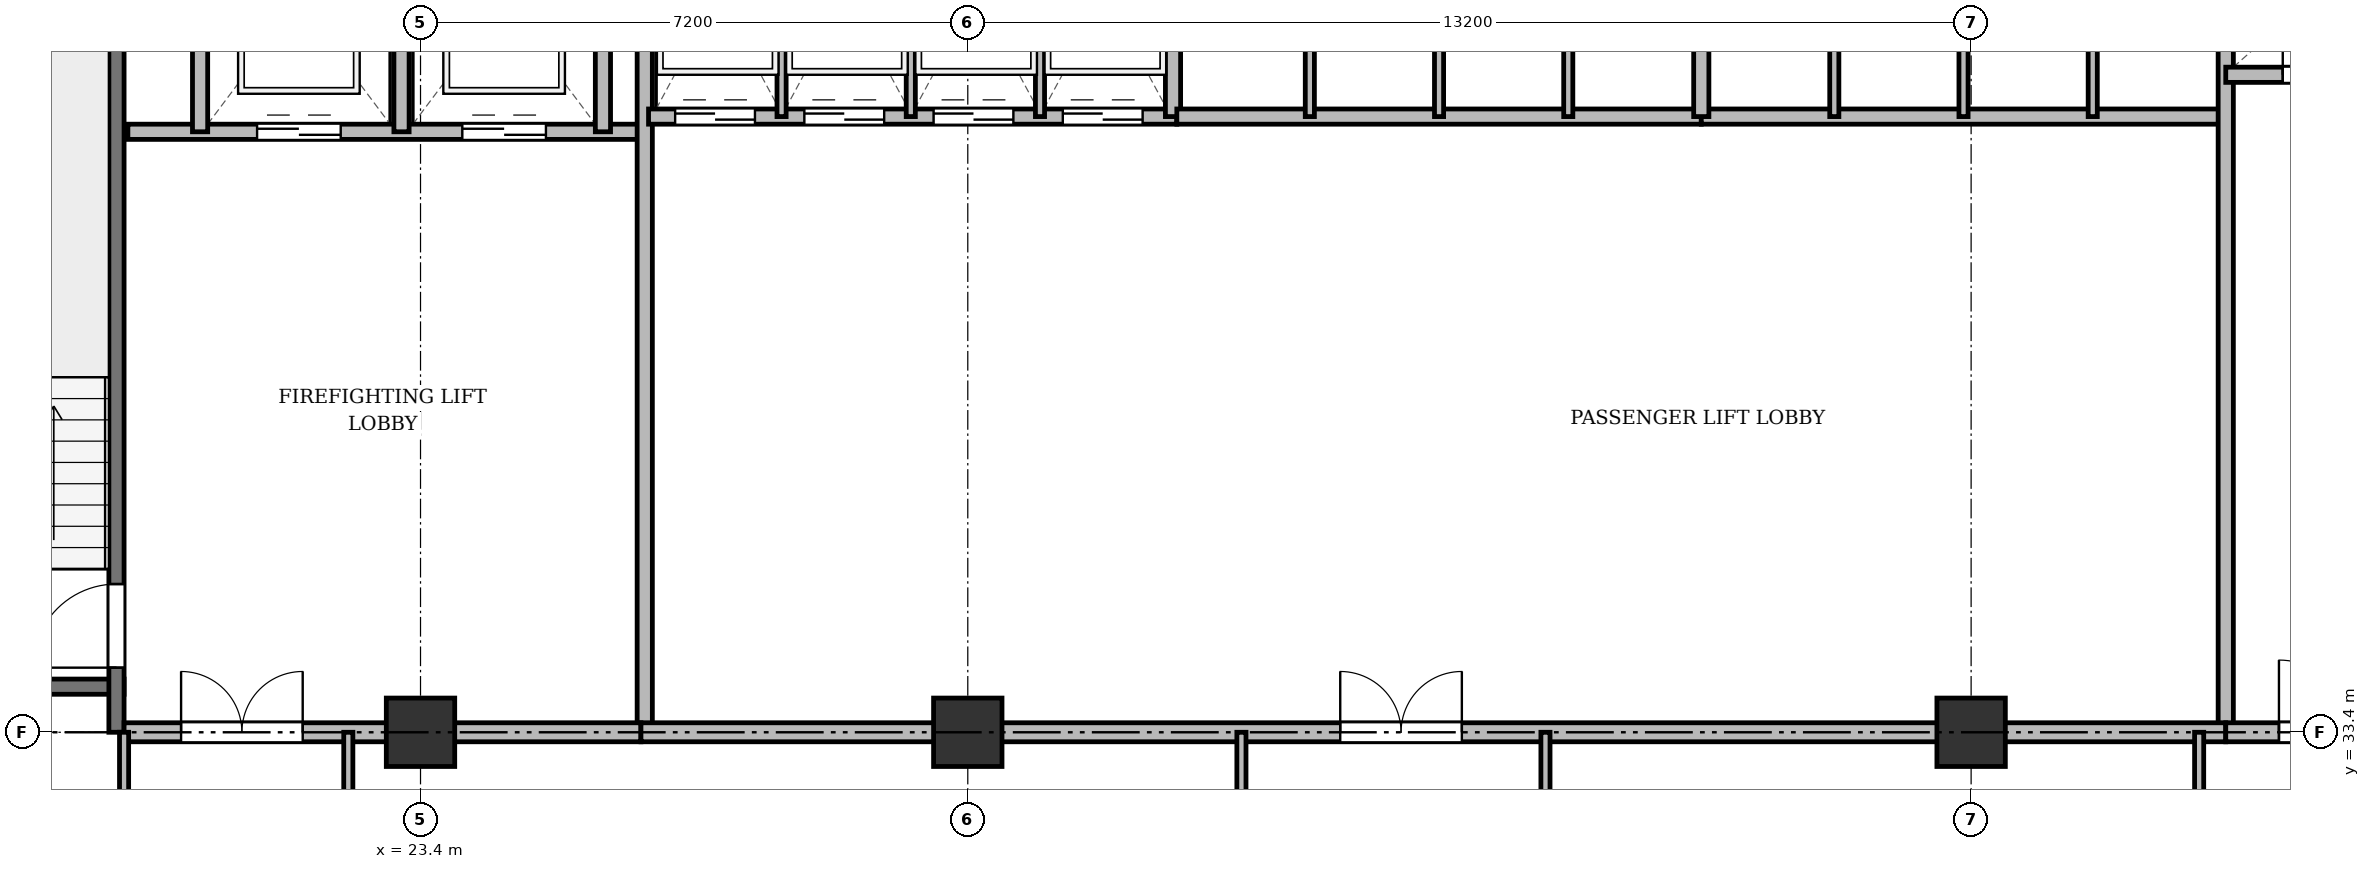
"""IFC4 building model, lengths in metres.
Left out: names, types, materials, properties, quantities, classifications, styles, units other than length and angle.
Written with IfcOpenShell. Run it as: python <this file> out.ifc"""

import sys

from ifc_helpers import new_model, si_unit, direction, frame, frame_2d, origin, origin_2d, place, context, subcontext, project, spatial, rectangle, extrude, source, transform, mapped, element, fill, save


model = new_model("IFC4")
c1 = context("Model", 3, precision=1e-05, world=origin(), true_north=direction((0.0, 1.0)))
c2 = subcontext(c1, "Body", "Model", "MODEL_VIEW")
j1 = project(units=[si_unit("LENGTHUNIT", "METRE"), si_unit("PLANEANGLEUNIT", "RADIAN")], contexts=[c1])
p1 = place(None, origin())
s1 = spatial("IfcSite", under=j1, at=p1, CompositionType="ELEMENT")
p2 = place(p1, origin())
s2 = spatial("IfcBuilding", under=s1, at=p2, CompositionType="ELEMENT")
p3 = place(p2, frame((0.0, 0.0, 27.1)))
s3 = spatial("IfcBuildingStorey", under=s2, at=p3, CompositionType="ELEMENT", Elevation=27.1)
m1 = source(origin(), c2, "Body", "SweptSolid", [
    extrude(rectangle(XDim=0.9, YDim=0.9, at=origin_2d()), origin(), (0.0, 0.0, 1.0), 3.6),
])
for number, where, z_axis, x_axis in (
    (1, (23.4, 33.4, 0.0), (0.0, 0.0, 1.0), (1.0, 0.0, 0.0)),
    (2, (30.6, 33.4, 0.0), (0.0, 0.0, 1.0), (1.0, 0.0, 0.0)),
    (3, (43.8, 33.4, 0.0), (0.0, 0.0, 1.0), (1.0, 0.0, 0.0)),
):
    element("IfcColumn", number, at=place(p3, frame(where, z_axis=z_axis, x_axis=x_axis)), inside=s3, PredefinedType="COLUMN", context=c2, shape_type="MappedRepresentation", body=[
        mapped(m1, transform((0.0, 0.0, 0.0), x_axis=(1.0, 0.0, 0.0), y_axis=(0.0, 1.0, 0.0), z_axis=(0.0, 0.0, 1.0), scale=1.0)),
    ])
p4 = place(p3, frame((16.1, 34.0, 0.0), z_axis=(0.0, 0.0, 1.0), x_axis=(1.0, 0.0, 0.0)))
e4 = element("IfcWall", 4, at=p4, inside=s3, PredefinedType="SHEAR", context=c2, shape_type="SweptSolid", body=[
    extrude(rectangle(XDim=3.4, YDim=0.2, at=frame_2d((1.7, 0.0))), origin(), (0.0, 0.0, 1.0), 3.34),
])
p5 = place(p3, frame((19.4, 33.4, 0.0), z_axis=(0.0, 0.0, 1.0), x_axis=(0.0, 1.0, 0.0)))
e5 = element("IfcWall", 5, at=p5, inside=s3, PredefinedType="SHEAR", context=c2, shape_type="SweptSolid", body=[
    extrude(rectangle(XDim=11.1, YDim=0.2, at=frame_2d((5.55, 0.0))), origin(), (0.0, 0.0, 1.0), 3.34),
])
p6 = place(p5, frame((0.85, 0.0, 0.0)))
e6 = element("IfcOpeningElement", 6, at=p6, cuts=e5, PredefinedType="OPENING", context=c2, shape_type="SweptSolid", body=[
    extrude(rectangle(XDim=1.1, YDim=2.15, at=frame_2d((0.55, 1.075))), frame((0.0, 0.11, 0.0), z_axis=(0.0, -1.0, 0.0), x_axis=(1.0, 0.0, 0.0)), (0.0, 0.0, 1.0), 0.22),
])
p7 = place(p3, frame((19.55, 41.3, 0.0), z_axis=(0.0, 0.0, 1.0), x_axis=(1.0, 0.0, 0.0)))
e7 = element("IfcWall", 7, at=p7, inside=s3, PredefinedType="SOLIDWALL", context=c2, shape_type="SweptSolid", body=[
    extrude(rectangle(XDim=6.75, YDim=0.2, at=frame_2d((3.375, 0.0))), origin(), (0.0, 0.0, 1.0), 3.34),
])
p8 = place(p7, frame((1.7, 0.0, 0.0)))
e8 = element("IfcOpeningElement", 8, at=p8, cuts=e7, PredefinedType="OPENING", context=c2, shape_type="SweptSolid", body=[
    extrude(rectangle(XDim=1.1, YDim=2.15, at=frame_2d((0.55, 1.075))), frame((0.0, 0.11, 0.0), z_axis=(0.0, -1.0, 0.0), x_axis=(1.0, 0.0, 0.0)), (0.0, 0.0, 1.0), 0.22),
])
p9 = place(p7, frame((4.4, 0.0, 0.0)))
e9 = element("IfcOpeningElement", 9, at=p9, cuts=e7, PredefinedType="OPENING", context=c2, shape_type="SweptSolid", body=[
    extrude(rectangle(XDim=1.1, YDim=2.15, at=frame_2d((0.55, 1.075))), frame((0.0, 0.11, 0.0), z_axis=(0.0, -1.0, 0.0), x_axis=(1.0, 0.0, 0.0)), (0.0, 0.0, 1.0), 0.22),
])
for number, where, z_axis, x_axis in (
    (10, (20.5, 41.3, 0.0), (0.0, 0.0, 1.0), (0.0, 1.0, 0.0)),
    (11, (23.15, 41.3, 0.0), (0.0, 0.0, 1.0), (0.0, 1.0, 0.0)),
    (12, (25.8, 41.3, 0.0), (0.0, 0.0, 1.0), (0.0, 1.0, 0.0)),
):
    element("IfcWall", number, at=place(p3, frame(where, z_axis=z_axis, x_axis=x_axis)), inside=s3, PredefinedType="SOLIDWALL", context=c2, shape_type="SweptSolid", body=[
        extrude(rectangle(XDim=3.4, YDim=0.2, at=frame_2d((1.7, 0.0))), origin(), (0.0, 0.0, 1.0), 3.34),
    ])
p10 = place(p3, frame((26.35, 33.4, 0.0), z_axis=(0.0, 0.0, 1.0), x_axis=(0.0, 1.0, 0.0)))
e13 = element("IfcWall", 13, at=p10, inside=s3, PredefinedType="SOLIDWALL", context=c2, shape_type="SweptSolid", body=[
    extrude(rectangle(XDim=11.3, YDim=0.2, at=frame_2d((5.65, 0.0))), origin(), (0.0, 0.0, 1.0), 2.69),
])
p11 = place(p3, frame((19.5, 33.4, 0.0), z_axis=(0.0, 0.0, 1.0), x_axis=(1.0, 0.0, 0.0)))
e14 = element("IfcWall", 14, at=p11, inside=s3, PredefinedType="PARTITIONING", context=c2, shape_type="SweptSolid", body=[
    extrude(rectangle(XDim=6.8, YDim=0.25, at=frame_2d((3.4, 0.0))), origin(), (0.0, 0.0, 1.0), 2.69),
])
p12 = place(p11, frame((0.75, 0.0, 0.0)))
e15 = element("IfcOpeningElement", 15, at=p12, cuts=e14, PredefinedType="OPENING", context=c2, shape_type="SweptSolid", body=[
    extrude(rectangle(XDim=1.6, YDim=2.2, at=frame_2d((0.8, 1.1))), frame((0.0, 0.135, 0.0), z_axis=(0.0, -1.0, 0.0), x_axis=(1.0, 0.0, 0.0)), (0.0, 0.0, 1.0), 0.27),
])
p13 = place(p3, frame((26.4, 41.5, 0.0), z_axis=(0.0, 0.0, 1.0), x_axis=(1.0, 0.0, 0.0)))
e16 = element("IfcWall", 16, at=p13, inside=s3, PredefinedType="SOLIDWALL", context=c2, shape_type="SweptSolid", body=[
    extrude(rectangle(XDim=6.95, YDim=0.2, at=frame_2d((3.475, 0.0))), origin(), (0.0, 0.0, 1.0), 3.34),
])
p14 = place(p13, frame((0.35, 0.0, 0.0)))
e17 = element("IfcOpeningElement", 17, at=p14, cuts=e16, PredefinedType="OPENING", context=c2, shape_type="SweptSolid", body=[
    extrude(rectangle(XDim=1.05, YDim=2.15, at=frame_2d((0.525, 1.075))), frame((0.0, 0.11, 0.0), z_axis=(0.0, -1.0, 0.0), x_axis=(1.0, 0.0, 0.0)), (0.0, 0.0, 1.0), 0.22),
])
p15 = place(p13, frame((2.05, 0.0, 0.0)))
e18 = element("IfcOpeningElement", 18, at=p15, cuts=e16, PredefinedType="OPENING", context=c2, shape_type="SweptSolid", body=[
    extrude(rectangle(XDim=1.05, YDim=2.15, at=frame_2d((0.525, 1.075))), frame((0.0, 0.11, 0.0), z_axis=(0.0, -1.0, 0.0), x_axis=(1.0, 0.0, 0.0)), (0.0, 0.0, 1.0), 0.22),
])
p16 = place(p13, frame((3.75, 0.0, 0.0)))
e19 = element("IfcOpeningElement", 19, at=p16, cuts=e16, PredefinedType="OPENING", context=c2, shape_type="SweptSolid", body=[
    extrude(rectangle(XDim=1.05, YDim=2.15, at=frame_2d((0.525, 1.075))), frame((0.0, 0.11, 0.0), z_axis=(0.0, -1.0, 0.0), x_axis=(1.0, 0.0, 0.0)), (0.0, 0.0, 1.0), 0.22),
])
p17 = place(p13, frame((5.45, 0.0, 0.0)))
e20 = element("IfcOpeningElement", 20, at=p17, cuts=e16, PredefinedType="OPENING", context=c2, shape_type="SweptSolid", body=[
    extrude(rectangle(XDim=1.05, YDim=2.15, at=frame_2d((0.525, 1.075))), frame((0.0, 0.11, 0.0), z_axis=(0.0, -1.0, 0.0), x_axis=(1.0, 0.0, 0.0)), (0.0, 0.0, 1.0), 0.22),
])
p18 = place(p3, frame((33.3, 41.5, 0.0), z_axis=(0.0, 0.0, 1.0), x_axis=(0.0, 1.0, 0.0)))
e21 = element("IfcWall", 21, at=p18, inside=s3, PredefinedType="SOLIDWALL", context=c2, shape_type="SweptSolid", body=[
    extrude(rectangle(XDim=3.2, YDim=0.2, at=frame_2d((1.6, 0.0))), origin(), (0.0, 0.0, 1.0), 3.34),
])
for number, where, z_axis, x_axis in (
    (22, (28.15, 41.5, 0.0), (0.0, 0.0, 1.0), (0.0, 1.0, 0.0)),
    (23, (29.85, 41.5, 0.0), (0.0, 0.0, 1.0), (0.0, 1.0, 0.0)),
    (24, (31.55, 41.5, 0.0), (0.0, 0.0, 1.0), (0.0, 1.0, 0.0)),
):
    element("IfcWall", number, at=place(p3, frame(where, z_axis=z_axis, x_axis=x_axis)), inside=s3, PredefinedType="PARTITIONING", context=c2, shape_type="SweptSolid", body=[
        extrude(rectangle(XDim=3.2, YDim=0.12, at=frame_2d((1.6, 0.0))), origin(), (0.0, 0.0, 1.0), 3.34),
    ])
p19 = place(p3, frame((33.35, 41.5, 0.0), z_axis=(0.0, 0.0, 1.0), x_axis=(1.0, 0.0, 0.0)))
e25 = element("IfcWall", 25, at=p19, inside=s3, PredefinedType="SOLIDWALL", context=c2, shape_type="SweptSolid", body=[
    extrude(rectangle(XDim=6.9, YDim=0.2, at=frame_2d((3.45, 0.0))), origin(), (0.0, 0.0, 1.0), 3.34),
])
for number, where, z_axis, x_axis in (
    (26, (35.1, 41.5, 0.0), (0.0, 0.0, 1.0), (0.0, 1.0, 0.0)),
    (27, (36.8, 41.5, 0.0), (0.0, 0.0, 1.0), (0.0, 1.0, 0.0)),
    (28, (38.5, 41.5, 0.0), (0.0, 0.0, 1.0), (0.0, 1.0, 0.0)),
):
    element("IfcWall", number, at=place(p3, frame(where, z_axis=z_axis, x_axis=x_axis)), inside=s3, PredefinedType="PARTITIONING", context=c2, shape_type="SweptSolid", body=[
        extrude(rectangle(XDim=3.2, YDim=0.12, at=frame_2d((1.6, 0.0))), origin(), (0.0, 0.0, 1.0), 3.34),
    ])
p20 = place(p3, frame((40.25, 41.5, 0.0), z_axis=(0.0, 0.0, 1.0), x_axis=(1.0, 0.0, 0.0)))
e29 = element("IfcWall", 29, at=p20, inside=s3, PredefinedType="SOLIDWALL", context=c2, shape_type="SweptSolid", body=[
    extrude(rectangle(XDim=6.9, YDim=0.2, at=frame_2d((3.45, 0.0))), origin(), (0.0, 0.0, 1.0), 2.752),
])
p21 = place(p3, frame((40.25, 41.5, 0.0), z_axis=(0.0, 0.0, 1.0), x_axis=(0.0, 1.0, 0.0)))
e30 = element("IfcWall", 30, at=p21, inside=s3, PredefinedType="SOLIDWALL", context=c2, shape_type="SweptSolid", body=[
    extrude(rectangle(XDim=3.2, YDim=0.2, at=frame_2d((1.6, 0.0))), origin(), (0.0, 0.0, 1.0), 3.34),
])
p22 = place(p3, frame((42.0, 41.5, 0.0), z_axis=(0.0, 0.0, 1.0), x_axis=(0.0, 1.0, 0.0)))
e31 = element("IfcWall", 31, at=p22, inside=s3, PredefinedType="PARTITIONING", context=c2, shape_type="SweptSolid", body=[
    extrude(rectangle(XDim=3.2, YDim=0.12, at=frame_2d((1.6, 0.0))), origin(), (0.0, 0.0, 1.0), 3.34),
])
p23 = place(p3, frame((43.7, 41.5, 0.0), z_axis=(0.0, 0.0, 1.0), x_axis=(0.0, 1.0, 0.0)))
e32 = element("IfcWall", 32, at=p23, inside=s3, PredefinedType="PARTITIONING", context=c2, shape_type="SweptSolid", body=[
    extrude(rectangle(XDim=3.2, YDim=0.12, at=frame_2d((1.6, 0.0))), origin(), (0.0, 0.0, 1.0), 2.752),
])
p24 = place(p3, frame((45.4, 41.5, 0.0), z_axis=(0.0, 0.0, 1.0), x_axis=(0.0, 1.0, 0.0)))
e33 = element("IfcWall", 33, at=p24, inside=s3, PredefinedType="PARTITIONING", context=c2, shape_type="SweptSolid", body=[
    extrude(rectangle(XDim=3.2, YDim=0.12, at=frame_2d((1.6, 0.0))), origin(), (0.0, 0.0, 1.0), 3.34),
])
p25 = place(p3, frame((47.15, 33.4, 0.0), z_axis=(0.0, 0.0, 1.0), x_axis=(0.0, 1.0, 0.0)))
e34 = element("IfcWall", 34, at=p25, inside=s3, PredefinedType="SOLIDWALL", context=c2, shape_type="SweptSolid", body=[
    extrude(rectangle(XDim=11.3, YDim=0.2, at=frame_2d((5.65, 0.0))), origin(), (0.0, 0.0, 1.0), 2.69),
])
p26 = place(p3, frame((26.3, 33.4, 0.0), z_axis=(0.0, 0.0, 1.0), x_axis=(1.0, 0.0, 0.0)))
e35 = element("IfcWall", 35, at=p26, inside=s3, PredefinedType="PARTITIONING", context=c2, shape_type="SweptSolid", body=[
    extrude(rectangle(XDim=20.85, YDim=0.25, at=frame_2d((10.425, 0.0))), origin(), (0.0, 0.0, 1.0), 2.69),
])
p27 = place(p26, frame((9.2, 0.0, 0.0)))
e36 = element("IfcOpeningElement", 36, at=p27, cuts=e35, PredefinedType="OPENING", context=c2, shape_type="SweptSolid", body=[
    extrude(rectangle(XDim=1.6, YDim=2.2, at=frame_2d((0.8, 1.1))), frame((0.0, 0.135, 0.0), z_axis=(0.0, -1.0, 0.0), x_axis=(1.0, 0.0, 0.0)), (0.0, 0.0, 1.0), 0.27),
])
p28 = place(p3, frame((47.15, 42.05, 0.0), z_axis=(0.0, 0.0, 1.0), x_axis=(1.0, 0.0, 0.0)))
e37 = element("IfcWall", 37, at=p28, inside=s3, PredefinedType="SOLIDWALL", context=c2, shape_type="SweptSolid", body=[
    extrude(rectangle(XDim=7.85, YDim=0.2, at=frame_2d((3.925, 0.0))), origin(), (0.0, 0.0, 1.0), 2.752),
])
p29 = place(p28, frame((0.75, 0.0, 0.0)))
e38 = element("IfcOpeningElement", 38, at=p29, cuts=e37, PredefinedType="OPENING", context=c2, shape_type="SweptSolid", body=[
    extrude(rectangle(XDim=0.9, YDim=2.1, at=frame_2d((0.45, 1.05))), frame((0.0, 0.11, 0.0), z_axis=(0.0, -1.0, 0.0), x_axis=(1.0, 0.0, 0.0)), (0.0, 0.0, 1.0), 0.22),
])
p30 = place(p28, frame((3.85, 0.0, 0.0)))
e39 = element("IfcOpeningElement", 39, at=p30, cuts=e37, PredefinedType="OPENING", context=c2, shape_type="SweptSolid", body=[
    extrude(rectangle(XDim=0.9, YDim=2.1, at=frame_2d((0.45, 1.05))), frame((0.0, 0.11, 0.0), z_axis=(0.0, -1.0, 0.0), x_axis=(1.0, 0.0, 0.0)), (0.0, 0.0, 1.0), 0.22),
])
p31 = place(p3, frame((47.15, 33.4, 0.0), z_axis=(0.0, 0.0, 1.0), x_axis=(1.0, 0.0, 0.0)))
e40 = element("IfcWall", 40, at=p31, inside=s3, PredefinedType="PARTITIONING", context=c2, shape_type="SweptSolid", body=[
    extrude(rectangle(XDim=11.15, YDim=0.25, at=frame_2d((5.575, 0.0))), origin(), (0.0, 0.0, 1.0), 2.69),
])
p32 = place(p31, frame((0.7, 0.0, 0.0)))
e41 = element("IfcOpeningElement", 41, at=p32, cuts=e40, PredefinedType="OPENING", context=c2, shape_type="SweptSolid", body=[
    extrude(rectangle(XDim=0.95, YDim=2.15, at=frame_2d((0.475, 1.075))), frame((0.0, 0.135, 0.0), z_axis=(0.0, -1.0, 0.0), x_axis=(1.0, 0.0, 0.0)), (0.0, 0.0, 1.0), 0.27),
])
p33 = place(p31, frame((6.0, 0.0, 0.0)))
e42 = element("IfcOpeningElement", 42, at=p33, cuts=e40, PredefinedType="OPENING", context=c2, shape_type="SweptSolid", body=[
    extrude(rectangle(XDim=1.2, YDim=2.15, at=frame_2d((0.6, 1.075))), frame((0.0, 0.135, 0.0), z_axis=(0.0, -1.0, 0.0), x_axis=(1.0, 0.0, 0.0)), (0.0, 0.0, 1.0), 0.27),
])
for number, where, z_axis, x_axis in (
    (43, (19.5, 29.8, 0.0), (0.0, 0.0, 1.0), (0.0, 1.0, 0.0)),
    (44, (22.45, 29.8, 0.0), (0.0, 0.0, 1.0), (0.0, 1.0, 0.0)),
    (45, (34.2, 29.8, 0.0), (0.0, 0.0, 1.0), (0.0, 1.0, 0.0)),
    (46, (38.2, 29.8, 0.0), (0.0, 0.0, 1.0), (0.0, 1.0, 0.0)),
    (47, (46.8, 29.8, 0.0), (0.0, 0.0, 1.0), (0.0, 1.0, 0.0)),
):
    element("IfcWall", number, at=place(p3, frame(where, z_axis=z_axis, x_axis=x_axis)), inside=s3, PredefinedType="PARTITIONING", context=c2, shape_type="SweptSolid", body=[
        extrude(rectangle(XDim=3.6, YDim=0.12, at=frame_2d((1.8, 0.0))), origin(), (0.0, 0.0, 1.0), 2.69),
    ])
m2 = source(origin(), c2, "Body", "SweptSolid", [
    extrude(rectangle(XDim=1.1, YDim=2.15, at=frame_2d((0.55, 1.075))), frame((0.0, 0.025, 0.0), z_axis=(0.0, -1.0, 0.0), x_axis=(1.0, 0.0, 0.0)), (0.0, 0.0, 1.0), 0.05),
])
p34 = place(p6, origin())
e48 = element("IfcDoor", 48, at=p34, inside=s3, OperationType="SINGLE_SWING_LEFT", PredefinedType="DOOR", context=c2, shape_type="MappedRepresentation", body=[
    mapped(m2, transform((0.0, 0.0, 0.0), x_axis=(1.0, 0.0, 0.0), y_axis=(0.0, 1.0, 0.0), z_axis=(0.0, 0.0, 1.0), scale=1.0)),
])
fill(e6, e48)
p35 = place(p8, origin())
e49 = element("IfcDoor", 49, at=p35, inside=s3, OperationType="DOUBLE_DOOR_SLIDING", PredefinedType="DOOR", context=c2, shape_type="MappedRepresentation", body=[
    mapped(m2, transform((0.0, 0.0, 0.0), x_axis=(1.0, 0.0, 0.0), y_axis=(0.0, 1.0, 0.0), z_axis=(0.0, 0.0, 1.0), scale=1.0)),
])
fill(e8, e49)
p36 = place(p9, origin())
e50 = element("IfcDoor", 50, at=p36, inside=s3, OperationType="DOUBLE_DOOR_SLIDING", PredefinedType="DOOR", context=c2, shape_type="MappedRepresentation", body=[
    mapped(m2, transform((0.0, 0.0, 0.0), x_axis=(1.0, 0.0, 0.0), y_axis=(0.0, 1.0, 0.0), z_axis=(0.0, 0.0, 1.0), scale=1.0)),
])
fill(e9, e50)
m3 = source(origin(), c2, "Body", "SweptSolid", [
    extrude(rectangle(XDim=1.6, YDim=2.2, at=frame_2d((0.8, 1.1))), frame((0.0, 0.025, 0.0), z_axis=(0.0, -1.0, 0.0), x_axis=(1.0, 0.0, 0.0)), (0.0, 0.0, 1.0), 0.05),
])
p37 = place(p12, origin())
e51 = element("IfcDoor", 51, at=p37, inside=s3, OperationType="DOUBLE_DOOR_SINGLE_SWING", PredefinedType="DOOR", context=c2, shape_type="MappedRepresentation", body=[
    mapped(m3, transform((0.0, 0.0, 0.0), x_axis=(1.0, 0.0, 0.0), y_axis=(0.0, 1.0, 0.0), z_axis=(0.0, 0.0, 1.0), scale=1.0)),
])
fill(e15, e51)
m4 = source(origin(), c2, "Body", "SweptSolid", [
    extrude(rectangle(XDim=1.05, YDim=2.15, at=frame_2d((0.525, 1.075))), frame((0.0, 0.025, 0.0), z_axis=(0.0, -1.0, 0.0), x_axis=(1.0, 0.0, 0.0)), (0.0, 0.0, 1.0), 0.05),
])
p38 = place(p14, origin())
e52 = element("IfcDoor", 52, at=p38, inside=s3, OperationType="DOUBLE_DOOR_SLIDING", PredefinedType="DOOR", context=c2, shape_type="MappedRepresentation", body=[
    mapped(m4, transform((0.0, 0.0, 0.0), x_axis=(1.0, 0.0, 0.0), y_axis=(0.0, 1.0, 0.0), z_axis=(0.0, 0.0, 1.0), scale=1.0)),
])
fill(e17, e52)
p39 = place(p15, origin())
e53 = element("IfcDoor", 53, at=p39, inside=s3, OperationType="DOUBLE_DOOR_SLIDING", PredefinedType="DOOR", context=c2, shape_type="MappedRepresentation", body=[
    mapped(m4, transform((0.0, 0.0, 0.0), x_axis=(1.0, 0.0, 0.0), y_axis=(0.0, 1.0, 0.0), z_axis=(0.0, 0.0, 1.0), scale=1.0)),
])
fill(e18, e53)
p40 = place(p16, origin())
e54 = element("IfcDoor", 54, at=p40, inside=s3, OperationType="DOUBLE_DOOR_SLIDING", PredefinedType="DOOR", context=c2, shape_type="MappedRepresentation", body=[
    mapped(m4, transform((0.0, 0.0, 0.0), x_axis=(1.0, 0.0, 0.0), y_axis=(0.0, 1.0, 0.0), z_axis=(0.0, 0.0, 1.0), scale=1.0)),
])
fill(e19, e54)
p41 = place(p17, origin())
e55 = element("IfcDoor", 55, at=p41, inside=s3, OperationType="DOUBLE_DOOR_SLIDING", PredefinedType="DOOR", context=c2, shape_type="MappedRepresentation", body=[
    mapped(m4, transform((0.0, 0.0, 0.0), x_axis=(1.0, 0.0, 0.0), y_axis=(0.0, 1.0, 0.0), z_axis=(0.0, 0.0, 1.0), scale=1.0)),
])
fill(e20, e55)
p42 = place(p27, origin())
e56 = element("IfcDoor", 56, at=p42, inside=s3, OperationType="DOUBLE_DOOR_SINGLE_SWING", PredefinedType="DOOR", context=c2, shape_type="MappedRepresentation", body=[
    mapped(m3, transform((0.0, 0.0, 0.0), x_axis=(1.0, 0.0, 0.0), y_axis=(0.0, 1.0, 0.0), z_axis=(0.0, 0.0, 1.0), scale=1.0)),
])
fill(e36, e56)
m5 = source(origin(), c2, "Body", "SweptSolid", [
    extrude(rectangle(XDim=0.9, YDim=2.1, at=frame_2d((0.45, 1.05))), frame((0.0, 0.025, 0.0), z_axis=(0.0, -1.0, 0.0), x_axis=(1.0, 0.0, 0.0)), (0.0, 0.0, 1.0), 0.05),
])
p43 = place(p29, origin())
e57 = element("IfcDoor", 57, at=p43, inside=s3, OperationType="SINGLE_SWING_LEFT", PredefinedType="DOOR", context=c2, shape_type="MappedRepresentation", body=[
    mapped(m5, transform((0.0, 0.0, 0.0), x_axis=(1.0, 0.0, 0.0), y_axis=(0.0, 1.0, 0.0), z_axis=(0.0, 0.0, 1.0), scale=1.0)),
])
fill(e38, e57)
m6 = source(origin(), c2, "Body", "SweptSolid", [
    extrude(rectangle(XDim=0.95, YDim=2.15, at=frame_2d((0.475, 1.075))), frame((0.0, 0.025, 0.0), z_axis=(0.0, -1.0, 0.0), x_axis=(1.0, 0.0, 0.0)), (0.0, 0.0, 1.0), 0.05),
])
p44 = place(p32, origin())
e58 = element("IfcDoor", 58, at=p44, inside=s3, OperationType="SINGLE_SWING_LEFT", PredefinedType="DOOR", context=c2, shape_type="MappedRepresentation", body=[
    mapped(m6, transform((0.0, 0.0, 0.0), x_axis=(1.0, 0.0, 0.0), y_axis=(0.0, 1.0, 0.0), z_axis=(0.0, 0.0, 1.0), scale=1.0)),
])
fill(e41, e58)
save(model, sys.argv[1])
